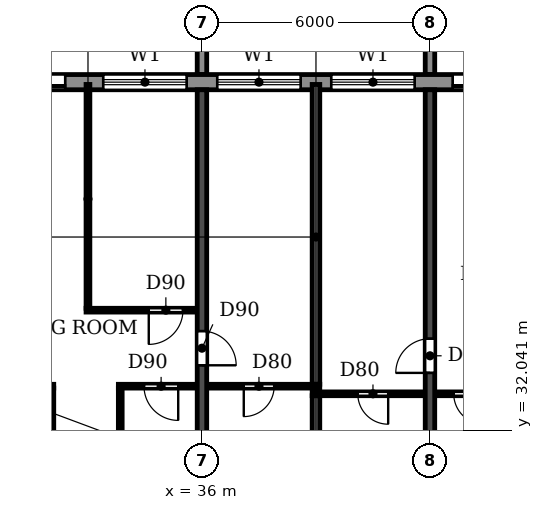
"""IFC4 building model, lengths in metres.
Left out: names, types, materials, properties, quantities, classifications, styles, units other than length and angle.
Written with IfcOpenShell. Run it as: python <this file> out.ifc"""

import sys

from ifc_helpers import new_model, si_unit, direction, frame, frame_2d, origin, place, context, subcontext, project, spatial, polyline, rectangle, outline, extrude, source, transform, mapped, element, fill, save


model = new_model("IFC4")
c1 = context("Model", 3, precision=1e-05, world=origin(), true_north=direction((0.0, 1.0)))
c2 = subcontext(c1, "Body", "Model", "MODEL_VIEW")
j1 = project(units=[si_unit("LENGTHUNIT", "METRE"), si_unit("PLANEANGLEUNIT", "RADIAN")], contexts=[c1])
p1 = place(None, origin())
s1 = spatial("IfcSite", under=j1, at=p1, CompositionType="ELEMENT")
p2 = place(p1, origin())
s2 = spatial("IfcBuilding", under=s1, at=p2, CompositionType="ELEMENT")
p3 = place(p2, frame((0.0, 0.0, 191.7)))
s3 = spatial("IfcBuildingStorey", under=s2, at=p3, CompositionType="ELEMENT", Elevation=191.7)
p4 = place(p3, frame((36.0, 30.5, 0.0), z_axis=(0.0, 0.0, 1.0), x_axis=(0.0, 1.0, 0.0)))
e1 = element("IfcWall", 1, at=p4, inside=s3, PredefinedType="SHEAR", context=c2, shape_type="SweptSolid", body=[
    extrude(rectangle(XDim=10.5, YDim=0.25, at=frame_2d((5.25, 0.0))), origin(), (0.0, 0.0, 1.0), 3.08),
])
p5 = place(p4, frame((3.25, 0.0, 0.0)))
e2 = element("IfcOpeningElement", 2, at=p5, cuts=e1, PredefinedType="OPENING", context=c2, shape_type="SweptSolid", body=[
    extrude(rectangle(XDim=0.9, YDim=2.1, at=frame_2d((0.45, 1.05))), frame((0.0, 0.135, 0.0), z_axis=(0.0, -1.0, 0.0), x_axis=(1.0, 0.0, 0.0)), (0.0, 0.0, 1.0), 0.27),
])
p6 = place(p3, frame((42.0, 30.5, 0.0), z_axis=(0.0, 0.0, 1.0), x_axis=(0.0, 1.0, 0.0)))
e3 = element("IfcWall", 3, at=p6, inside=s3, PredefinedType="SHEAR", context=c2, shape_type="SweptSolid", body=[
    extrude(rectangle(XDim=10.5, YDim=0.25, at=frame_2d((5.25, 0.0))), origin(), (0.0, 0.0, 1.0), 3.08),
])
p7 = place(p6, frame((3.05, 0.0, 0.0)))
e4 = element("IfcOpeningElement", 4, at=p7, cuts=e3, PredefinedType="OPENING", context=c2, shape_type="SweptSolid", body=[
    extrude(rectangle(XDim=0.9, YDim=2.1, at=frame_2d((0.45, 1.05))), frame((0.0, 0.135, 0.0), z_axis=(0.0, -1.0, 0.0), x_axis=(1.0, 0.0, 0.0)), (0.0, 0.0, 1.0), 0.27),
])
p8 = place(p3, frame((79.317, 41.2, 0.0), z_axis=(0.0, 0.0, 1.0), x_axis=(-1.0, 0.0, 0.0)))
e5 = element("IfcWall", 5, at=p8, inside=s3, PredefinedType="STANDARD", context=c2, shape_type="SweptSolid", body=[
    extrude(rectangle(XDim=56.634, YDim=0.4, at=frame_2d((28.317, 0.0))), origin(), (0.0, 0.0, 1.0), 3.08),
])
p9 = place(p8, frame((52.917, 0.0, 0.0)))
e6 = element("IfcOpeningElement", 6, at=p9, cuts=e5, PredefinedType="OPENING", context=c2, shape_type="SweptSolid", body=[
    extrude(rectangle(XDim=1.8, YDim=2.4, at=frame_2d((0.9, 1.2))), frame((0.0, 0.21, 0.0), z_axis=(0.0, -1.0, 0.0), x_axis=(1.0, 0.0, 0.0)), (0.0, 0.0, 1.0), 0.42),
])
p10 = place(p8, frame((49.717, 0.0, 0.9)))
e7 = element("IfcOpeningElement", 7, at=p10, cuts=e5, PredefinedType="OPENING", context=c2, shape_type="SweptSolid", body=[
    extrude(rectangle(XDim=2.2, YDim=1.5, at=frame_2d((1.1, 0.75))), frame((0.0, 0.21, 0.0), z_axis=(0.0, -1.0, 0.0), x_axis=(1.0, 0.0, 0.0)), (0.0, 0.0, 1.0), 0.42),
])
p11 = place(p8, frame((46.917, 0.0, 0.0)))
e8 = element("IfcOpeningElement", 8, at=p11, cuts=e5, PredefinedType="OPENING", context=c2, shape_type="SweptSolid", body=[
    extrude(rectangle(XDim=1.8, YDim=2.4, at=frame_2d((0.9, 1.2))), frame((0.0, 0.21, 0.0), z_axis=(0.0, -1.0, 0.0), x_axis=(1.0, 0.0, 0.0)), (0.0, 0.0, 1.0), 0.42),
])
p12 = place(p8, frame((43.717, 0.0, 0.9)))
e9 = element("IfcOpeningElement", 9, at=p12, cuts=e5, PredefinedType="OPENING", context=c2, shape_type="SweptSolid", body=[
    extrude(rectangle(XDim=2.2, YDim=1.5, at=frame_2d((1.1, 0.75))), frame((0.0, 0.21, 0.0), z_axis=(0.0, -1.0, 0.0), x_axis=(1.0, 0.0, 0.0)), (0.0, 0.0, 1.0), 0.42),
])
p13 = place(p8, frame((40.717, 0.0, 0.9)))
e10 = element("IfcOpeningElement", 10, at=p13, cuts=e5, PredefinedType="OPENING", context=c2, shape_type="SweptSolid", body=[
    extrude(rectangle(XDim=2.2, YDim=1.5, at=frame_2d((1.1, 0.75))), frame((0.0, 0.21, 0.0), z_axis=(0.0, -1.0, 0.0), x_axis=(1.0, 0.0, 0.0)), (0.0, 0.0, 1.0), 0.42),
])
p14 = place(p8, frame((37.717, 0.0, 0.9)))
e11 = element("IfcOpeningElement", 11, at=p14, cuts=e5, PredefinedType="OPENING", context=c2, shape_type="SweptSolid", body=[
    extrude(rectangle(XDim=2.2, YDim=1.5, at=frame_2d((1.1, 0.75))), frame((0.0, 0.21, 0.0), z_axis=(0.0, -1.0, 0.0), x_axis=(1.0, 0.0, 0.0)), (0.0, 0.0, 1.0), 0.42),
])
p15 = place(p8, frame((34.917, 0.0, 0.0)))
e12 = element("IfcOpeningElement", 12, at=p15, cuts=e5, PredefinedType="OPENING", context=c2, shape_type="SweptSolid", body=[
    extrude(rectangle(XDim=1.8, YDim=2.4, at=frame_2d((0.9, 1.2))), frame((0.0, 0.21, 0.0), z_axis=(0.0, -1.0, 0.0), x_axis=(1.0, 0.0, 0.0)), (0.0, 0.0, 1.0), 0.42),
])
p16 = place(p8, frame((31.717, 0.0, 0.9)))
e13 = element("IfcOpeningElement", 13, at=p16, cuts=e5, PredefinedType="OPENING", context=c2, shape_type="SweptSolid", body=[
    extrude(rectangle(XDim=2.2, YDim=1.5, at=frame_2d((1.1, 0.75))), frame((0.0, 0.21, 0.0), z_axis=(0.0, -1.0, 0.0), x_axis=(1.0, 0.0, 0.0)), (0.0, 0.0, 1.0), 0.42),
])
p17 = place(p8, frame((28.717, 0.0, 0.9)))
e14 = element("IfcOpeningElement", 14, at=p17, cuts=e5, PredefinedType="OPENING", context=c2, shape_type="SweptSolid", body=[
    extrude(rectangle(XDim=2.2, YDim=1.5, at=frame_2d((1.1, 0.75))), frame((0.0, 0.21, 0.0), z_axis=(0.0, -1.0, 0.0), x_axis=(1.0, 0.0, 0.0)), (0.0, 0.0, 1.0), 0.42),
])
p18 = place(p8, frame((25.717, 0.0, 0.9)))
e15 = element("IfcOpeningElement", 15, at=p18, cuts=e5, PredefinedType="OPENING", context=c2, shape_type="SweptSolid", body=[
    extrude(rectangle(XDim=2.2, YDim=1.5, at=frame_2d((1.1, 0.75))), frame((0.0, 0.21, 0.0), z_axis=(0.0, -1.0, 0.0), x_axis=(1.0, 0.0, 0.0)), (0.0, 0.0, 1.0), 0.42),
])
p19 = place(p8, frame((22.917, 0.0, 0.0)))
e16 = element("IfcOpeningElement", 16, at=p19, cuts=e5, PredefinedType="OPENING", context=c2, shape_type="SweptSolid", body=[
    extrude(rectangle(XDim=1.8, YDim=2.4, at=frame_2d((0.9, 1.2))), frame((0.0, 0.21, 0.0), z_axis=(0.0, -1.0, 0.0), x_axis=(1.0, 0.0, 0.0)), (0.0, 0.0, 1.0), 0.42),
])
p20 = place(p8, frame((19.717, 0.0, 0.9)))
e17 = element("IfcOpeningElement", 17, at=p20, cuts=e5, PredefinedType="OPENING", context=c2, shape_type="SweptSolid", body=[
    extrude(rectangle(XDim=2.2, YDim=1.5, at=frame_2d((1.1, 0.75))), frame((0.0, 0.21, 0.0), z_axis=(0.0, -1.0, 0.0), x_axis=(1.0, 0.0, 0.0)), (0.0, 0.0, 1.0), 0.42),
])
p21 = place(p8, frame((16.717, 0.0, 0.9)))
e18 = element("IfcOpeningElement", 18, at=p21, cuts=e5, PredefinedType="OPENING", context=c2, shape_type="SweptSolid", body=[
    extrude(rectangle(XDim=2.2, YDim=1.5, at=frame_2d((1.1, 0.75))), frame((0.0, 0.21, 0.0), z_axis=(0.0, -1.0, 0.0), x_axis=(1.0, 0.0, 0.0)), (0.0, 0.0, 1.0), 0.42),
])
p22 = place(p8, frame((13.717, 0.0, 0.9)))
e19 = element("IfcOpeningElement", 19, at=p22, cuts=e5, PredefinedType="OPENING", context=c2, shape_type="SweptSolid", body=[
    extrude(rectangle(XDim=2.2, YDim=1.5, at=frame_2d((1.1, 0.75))), frame((0.0, 0.21, 0.0), z_axis=(0.0, -1.0, 0.0), x_axis=(1.0, 0.0, 0.0)), (0.0, 0.0, 1.0), 0.42),
])
p23 = place(p8, frame((10.717, 0.0, 0.9)))
e20 = element("IfcOpeningElement", 20, at=p23, cuts=e5, PredefinedType="OPENING", context=c2, shape_type="SweptSolid", body=[
    extrude(rectangle(XDim=2.2, YDim=1.5, at=frame_2d((1.1, 0.75))), frame((0.0, 0.21, 0.0), z_axis=(0.0, -1.0, 0.0), x_axis=(1.0, 0.0, 0.0)), (0.0, 0.0, 1.0), 0.42),
])
p24 = place(p8, frame((7.917, 0.0, 0.0)))
e21 = element("IfcOpeningElement", 21, at=p24, cuts=e5, PredefinedType="OPENING", context=c2, shape_type="SweptSolid", body=[
    extrude(rectangle(XDim=1.8, YDim=2.4, at=frame_2d((0.9, 1.2))), frame((0.0, 0.21, 0.0), z_axis=(0.0, -1.0, 0.0), x_axis=(1.0, 0.0, 0.0)), (0.0, 0.0, 1.0), 0.42),
])
p25 = place(p8, frame((4.717, 0.0, 0.9)))
e22 = element("IfcOpeningElement", 22, at=p25, cuts=e5, PredefinedType="OPENING", context=c2, shape_type="SweptSolid", body=[
    extrude(rectangle(XDim=2.2, YDim=1.5, at=frame_2d((1.1, 0.75))), frame((0.0, 0.21, 0.0), z_axis=(0.0, -1.0, 0.0), x_axis=(1.0, 0.0, 0.0)), (0.0, 0.0, 1.0), 0.42),
])
p26 = place(p8, frame((1.917, 0.0, 0.0)))
e23 = element("IfcOpeningElement", 23, at=p26, cuts=e5, PredefinedType="OPENING", context=c2, shape_type="SweptSolid", body=[
    extrude(rectangle(XDim=1.8, YDim=2.4, at=frame_2d((0.9, 1.2))), frame((0.0, 0.21, 0.0), z_axis=(0.0, -1.0, 0.0), x_axis=(1.0, 0.0, 0.0)), (0.0, 0.0, 1.0), 0.42),
])
m1 = source(origin(), c2, "Body", "SweptSolid", [
    extrude(outline(polyline([(0.0, 0.0), (0.25, 0.0), (0.25, 3.1), (0.0, 3.1), (0.0, 0.0)])), origin(), (0.0, 0.0, 1.0), 3.1),
])
for number, where in (
    (24, (35.875, 41.4, 0.0)),
    (25, (41.875, 41.4, 0.0)),
):
    element("IfcWall", number, at=place(p3, frame(where)), inside=s3, PredefinedType="STANDARD", context=c2, shape_type="MappedRepresentation", body=[
        mapped(m1, transform((0.0, 0.0, 0.0))),
    ])
p27 = place(p3, frame((39.0, 30.51, 0.0), z_axis=(0.0, 0.0, 1.0), x_axis=(0.0, 1.0, 0.0)))
e26 = element("IfcWall", 26, at=p27, inside=s3, PredefinedType="PARTITIONING", context=c2, shape_type="SweptSolid", body=[
    extrude(rectangle(XDim=2.44, YDim=0.2, at=frame_2d((1.22, 0.0))), origin(), (0.0, 0.0, 1.0), 3.08),
])
p28 = place(p3, frame((39.0, 33.25, 0.0), z_axis=(0.0, 0.0, 1.0), x_axis=(0.0, 1.0, 0.0)))
e27 = element("IfcWall", 27, at=p28, inside=s3, PredefinedType="PARTITIONING", context=c2, shape_type="SweptSolid", body=[
    extrude(rectangle(XDim=7.89, YDim=0.2, at=frame_2d((3.945, 0.0))), origin(), (0.0, 0.0, 1.0), 3.08),
])
p29 = place(p3, frame((38.9, 33.0, 0.0), z_axis=(0.0, 0.0, 1.0), x_axis=(1.0, 0.0, 0.0)))
e28 = element("IfcWall", 28, at=p29, inside=s3, PredefinedType="PARTITIONING", context=c2, shape_type="SweptSolid", body=[
    extrude(rectangle(XDim=2.965, YDim=0.1, at=frame_2d((1.482, 0.0))), origin(), (0.0, 0.0, 1.0), 3.08),
])
p30 = place(p29, frame((1.2, 0.0, 0.0)))
e29 = element("IfcOpeningElement", 29, at=p30, cuts=e28, PredefinedType="OPENING", context=c2, shape_type="SweptSolid", body=[
    extrude(rectangle(XDim=0.8, YDim=2.1, at=frame_2d((0.4, 1.05))), frame((0.0, 0.06, 0.0), z_axis=(0.0, -1.0, 0.0), x_axis=(1.0, 0.0, 0.0)), (0.0, 0.0, 1.0), 0.12),
])
p31 = place(p3, frame((42.135, 33.0, 0.0), z_axis=(0.0, 0.0, 1.0), x_axis=(1.0, 0.0, 0.0)))
e30 = element("IfcWall", 30, at=p31, inside=s3, PredefinedType="PARTITIONING", context=c2, shape_type="SweptSolid", body=[
    extrude(rectangle(XDim=1.965, YDim=0.1, at=frame_2d((0.982, 0.0))), origin(), (0.0, 0.0, 1.0), 3.08),
])
p32 = place(p31, frame((0.49, 0.0, 0.0)))
e31 = element("IfcOpeningElement", 31, at=p32, cuts=e30, PredefinedType="OPENING", context=c2, shape_type="SweptSolid", body=[
    extrude(rectangle(XDim=0.8, YDim=2.1, at=frame_2d((0.4, 1.05))), frame((0.0, 0.06, 0.0), z_axis=(0.0, -1.0, 0.0), x_axis=(1.0, 0.0, 0.0)), (0.0, 0.0, 1.0), 0.12),
])
p33 = place(p3, frame((30.135, 33.2, 0.0), z_axis=(0.0, 0.0, 1.0), x_axis=(1.0, 0.0, 0.0)))
e32 = element("IfcWall", 32, at=p33, inside=s3, PredefinedType="PARTITIONING", context=c2, shape_type="SweptSolid", body=[
    extrude(rectangle(XDim=1.965, YDim=0.1, at=frame_2d((0.982, 0.0))), origin(), (0.0, 0.0, 1.0), 3.08),
])
p34 = place(p33, frame((0.49, 0.0, 0.0)))
e33 = element("IfcOpeningElement", 33, at=p34, cuts=e32, PredefinedType="OPENING", context=c2, shape_type="SweptSolid", body=[
    extrude(rectangle(XDim=0.8, YDim=2.1, at=frame_2d((0.4, 1.05))), frame((0.0, 0.06, 0.0), z_axis=(0.0, -1.0, 0.0), x_axis=(1.0, 0.0, 0.0)), (0.0, 0.0, 1.0), 0.12),
])
p35 = place(p3, frame((33.8, 33.2, 0.0), z_axis=(0.0, 0.0, 1.0), x_axis=(1.0, 0.0, 0.0)))
e34 = element("IfcWall", 34, at=p35, inside=s3, PredefinedType="PARTITIONING", context=c2, shape_type="SweptSolid", body=[
    extrude(rectangle(XDim=2.065, YDim=0.1, at=frame_2d((1.032, 0.0))), origin(), (0.0, 0.0, 1.0), 3.08),
])
p36 = place(p35, frame((0.675, 0.0, 0.0)))
e35 = element("IfcOpeningElement", 35, at=p36, cuts=e34, PredefinedType="OPENING", context=c2, shape_type="SweptSolid", body=[
    extrude(rectangle(XDim=0.9, YDim=2.1, at=frame_2d((0.45, 1.05))), frame((0.0, 0.06, 0.0), z_axis=(0.0, -1.0, 0.0), x_axis=(1.0, 0.0, 0.0)), (0.0, 0.0, 1.0), 0.12),
])
p37 = place(p3, frame((36.135, 33.2, 0.0), z_axis=(0.0, 0.0, 1.0), x_axis=(1.0, 0.0, 0.0)))
e36 = element("IfcWall", 36, at=p37, inside=s3, PredefinedType="PARTITIONING", context=c2, shape_type="SweptSolid", body=[
    extrude(rectangle(XDim=2.965, YDim=0.1, at=frame_2d((1.482, 0.0))), origin(), (0.0, 0.0, 1.0), 3.08),
])
p38 = place(p37, frame((0.965, 0.0, 0.0)))
e37 = element("IfcOpeningElement", 37, at=p38, cuts=e36, PredefinedType="OPENING", context=c2, shape_type="SweptSolid", body=[
    extrude(rectangle(XDim=0.8, YDim=2.1, at=frame_2d((0.4, 1.05))), frame((0.0, 0.06, 0.0), z_axis=(0.0, -1.0, 0.0), x_axis=(1.0, 0.0, 0.0)), (0.0, 0.0, 1.0), 0.12),
])
p39 = place(p3, frame((32.95, 35.2, 0.0), z_axis=(0.0, 0.0, 1.0), x_axis=(1.0, 0.0, 0.0)))
e38 = element("IfcWall", 38, at=p39, inside=s3, PredefinedType="PARTITIONING", context=c2, shape_type="SweptSolid", body=[
    extrude(rectangle(XDim=2.915, YDim=0.1, at=frame_2d((1.458, 0.0))), origin(), (0.0, 0.0, 1.0), 3.08),
])
p40 = place(p39, frame((1.65, 0.0, 0.0)))
e39 = element("IfcOpeningElement", 39, at=p40, cuts=e38, PredefinedType="OPENING", context=c2, shape_type="SweptSolid", body=[
    extrude(rectangle(XDim=0.9, YDim=2.1, at=frame_2d((0.45, 1.05))), frame((0.0, 0.06, 0.0), z_axis=(0.0, -1.0, 0.0), x_axis=(1.0, 0.0, 0.0)), (0.0, 0.0, 1.0), 0.12),
])
p41 = place(p3, frame((32.05, 30.51, 0.0), z_axis=(0.0, 0.0, 1.0), x_axis=(0.0, 1.0, 0.0)))
e40 = element("IfcWall", 40, at=p41, inside=s3, PredefinedType="PARTITIONING", context=c2, shape_type="SweptSolid", body=[
    extrude(rectangle(XDim=2.64, YDim=0.1, at=frame_2d((1.32, 0.0))), origin(), (0.0, 0.0, 1.0), 3.08),
])
p42 = place(p3, frame((33.0, 35.25, 0.0), z_axis=(0.0, 0.0, 1.0), x_axis=(0.0, 1.0, 0.0)))
e41 = element("IfcWall", 41, at=p42, inside=s3, PredefinedType="PARTITIONING", context=c2, shape_type="SweptSolid", body=[
    extrude(rectangle(XDim=5.89, YDim=0.1, at=frame_2d((2.945, 0.0))), origin(), (0.0, 0.0, 1.0), 3.08),
])
p43 = place(p3, frame((33.85, 30.51, 0.0), z_axis=(0.0, 0.0, 1.0), x_axis=(0.0, 1.0, 0.0)))
e42 = element("IfcWall", 42, at=p43, inside=s3, PredefinedType="PARTITIONING", context=c2, shape_type="SweptSolid", body=[
    extrude(rectangle(XDim=2.64, YDim=0.1, at=frame_2d((1.32, 0.0))), origin(), (0.0, 0.0, 1.0), 3.08),
])
p44 = place(p11, origin())
e43 = element("IfcDoor", 43, at=p44, inside=s3, OperationType="DOUBLE_DOOR_SLIDING", PredefinedType="DOOR", context=c2, shape_type="SweptSolid", body=[
    extrude(rectangle(XDim=1.8, YDim=2.4, at=frame_2d((0.9, 1.2))), frame((0.0, 0.025, 0.0), z_axis=(0.0, -1.0, 0.0), x_axis=(1.0, 0.0, 0.0)), (0.0, 0.0, 1.0), 0.05),
])
fill(e8, e43)
p45 = place(p12, origin())
e44 = element("IfcWindow", 44, at=p45, inside=s3, PartitioningType="DOUBLE_PANEL_HORIZONTAL", PredefinedType="WINDOW", context=c2, shape_type="SweptSolid", body=[
    extrude(rectangle(XDim=2.2, YDim=1.5, at=frame_2d((1.1, 0.75))), frame((0.0, 0.03, 0.0), z_axis=(0.0, -1.0, 0.0), x_axis=(1.0, 0.0, 0.0)), (0.0, 0.0, 1.0), 0.06),
])
fill(e9, e44)
p46 = place(p13, origin())
e45 = element("IfcWindow", 45, at=p46, inside=s3, PartitioningType="DOUBLE_PANEL_HORIZONTAL", PredefinedType="WINDOW", context=c2, shape_type="SweptSolid", body=[
    extrude(rectangle(XDim=2.2, YDim=1.5, at=frame_2d((1.1, 0.75))), frame((0.0, 0.03, 0.0), z_axis=(0.0, -1.0, 0.0), x_axis=(1.0, 0.0, 0.0)), (0.0, 0.0, 1.0), 0.06),
])
fill(e10, e45)
p47 = place(p14, origin())
e46 = element("IfcWindow", 46, at=p47, inside=s3, PartitioningType="DOUBLE_PANEL_HORIZONTAL", PredefinedType="WINDOW", context=c2, shape_type="SweptSolid", body=[
    extrude(rectangle(XDim=2.2, YDim=1.5, at=frame_2d((1.1, 0.75))), frame((0.0, 0.03, 0.0), z_axis=(0.0, -1.0, 0.0), x_axis=(1.0, 0.0, 0.0)), (0.0, 0.0, 1.0), 0.06),
])
fill(e11, e46)
p48 = place(p15, origin())
e47 = element("IfcDoor", 47, at=p48, inside=s3, OperationType="DOUBLE_DOOR_SLIDING", PredefinedType="DOOR", context=c2, shape_type="SweptSolid", body=[
    extrude(rectangle(XDim=1.8, YDim=2.4, at=frame_2d((0.9, 1.2))), frame((0.0, 0.025, 0.0), z_axis=(0.0, -1.0, 0.0), x_axis=(1.0, 0.0, 0.0)), (0.0, 0.0, 1.0), 0.05),
])
fill(e12, e47)
p49 = place(p38, frame((0.8, 0.0, 0.0), z_axis=(0.0, 0.0, 1.0), x_axis=(-1.0, 0.0, 0.0)))
e48 = element("IfcDoor", 48, at=p49, inside=s3, OperationType="SINGLE_SWING_RIGHT", PredefinedType="DOOR", context=c2, shape_type="SweptSolid", body=[
    extrude(rectangle(XDim=0.8, YDim=2.1, at=frame_2d((0.4, 1.05))), frame((0.0, 0.025, 0.0), z_axis=(0.0, -1.0, 0.0), x_axis=(1.0, 0.0, 0.0)), (0.0, 0.0, 1.0), 0.05),
])
fill(e37, e48)
p50 = place(p36, frame((0.9, 0.0, 0.0), z_axis=(0.0, 0.0, 1.0), x_axis=(-1.0, 0.0, 0.0)))
e49 = element("IfcDoor", 49, at=p50, inside=s3, OperationType="SINGLE_SWING_LEFT", PredefinedType="DOOR", context=c2, shape_type="SweptSolid", body=[
    extrude(rectangle(XDim=0.9, YDim=2.1, at=frame_2d((0.45, 1.05))), frame((0.0, 0.025, 0.0), z_axis=(0.0, -1.0, 0.0), x_axis=(1.0, 0.0, 0.0)), (0.0, 0.0, 1.0), 0.05),
])
fill(e35, e49)
p51 = place(p40, frame((0.9, 0.0, 0.0), z_axis=(0.0, 0.0, 1.0), x_axis=(-1.0, 0.0, 0.0)))
e50 = element("IfcDoor", 50, at=p51, inside=s3, OperationType="SINGLE_SWING_RIGHT", PredefinedType="DOOR", context=c2, shape_type="SweptSolid", body=[
    extrude(rectangle(XDim=0.9, YDim=2.1, at=frame_2d((0.45, 1.05))), frame((0.0, 0.025, 0.0), z_axis=(0.0, -1.0, 0.0), x_axis=(1.0, 0.0, 0.0)), (0.0, 0.0, 1.0), 0.05),
])
fill(e39, e50)
p52 = place(p5, frame((0.9, 0.0, 0.0), z_axis=(0.0, 0.0, 1.0), x_axis=(-1.0, 0.0, 0.0)))
e51 = element("IfcDoor", 51, at=p52, inside=s3, OperationType="SINGLE_SWING_RIGHT", PredefinedType="DOOR", context=c2, shape_type="SweptSolid", body=[
    extrude(rectangle(XDim=0.9, YDim=2.1, at=frame_2d((0.45, 1.05))), frame((0.0, 0.025, 0.0), z_axis=(0.0, -1.0, 0.0), x_axis=(1.0, 0.0, 0.0)), (0.0, 0.0, 1.0), 0.05),
])
fill(e2, e51)
p53 = place(p30, frame((0.8, 0.0, 0.0), z_axis=(0.0, 0.0, 1.0), x_axis=(-1.0, 0.0, 0.0)))
e52 = element("IfcDoor", 52, at=p53, inside=s3, OperationType="SINGLE_SWING_LEFT", PredefinedType="DOOR", context=c2, shape_type="SweptSolid", body=[
    extrude(rectangle(XDim=0.8, YDim=2.1, at=frame_2d((0.4, 1.05))), frame((0.0, 0.025, 0.0), z_axis=(0.0, -1.0, 0.0), x_axis=(1.0, 0.0, 0.0)), (0.0, 0.0, 1.0), 0.05),
])
fill(e29, e52)
p54 = place(p7, origin())
e53 = element("IfcDoor", 53, at=p54, inside=s3, OperationType="SINGLE_SWING_LEFT", PredefinedType="DOOR", context=c2, shape_type="SweptSolid", body=[
    extrude(rectangle(XDim=0.9, YDim=2.1, at=frame_2d((0.45, 1.05))), frame((0.0, 0.025, 0.0), z_axis=(0.0, -1.0, 0.0), x_axis=(1.0, 0.0, 0.0)), (0.0, 0.0, 1.0), 0.05),
])
fill(e4, e53)
p55 = place(p32, frame((0.8, 0.0, 0.0), z_axis=(0.0, 0.0, 1.0), x_axis=(-1.0, 0.0, 0.0)))
e54 = element("IfcDoor", 54, at=p55, inside=s3, OperationType="SINGLE_SWING_LEFT", PredefinedType="DOOR", context=c2, shape_type="SweptSolid", body=[
    extrude(rectangle(XDim=0.8, YDim=2.1, at=frame_2d((0.4, 1.05))), frame((0.0, 0.025, 0.0), z_axis=(0.0, -1.0, 0.0), x_axis=(1.0, 0.0, 0.0)), (0.0, 0.0, 1.0), 0.05),
])
fill(e31, e54)
save(model, sys.argv[1])
